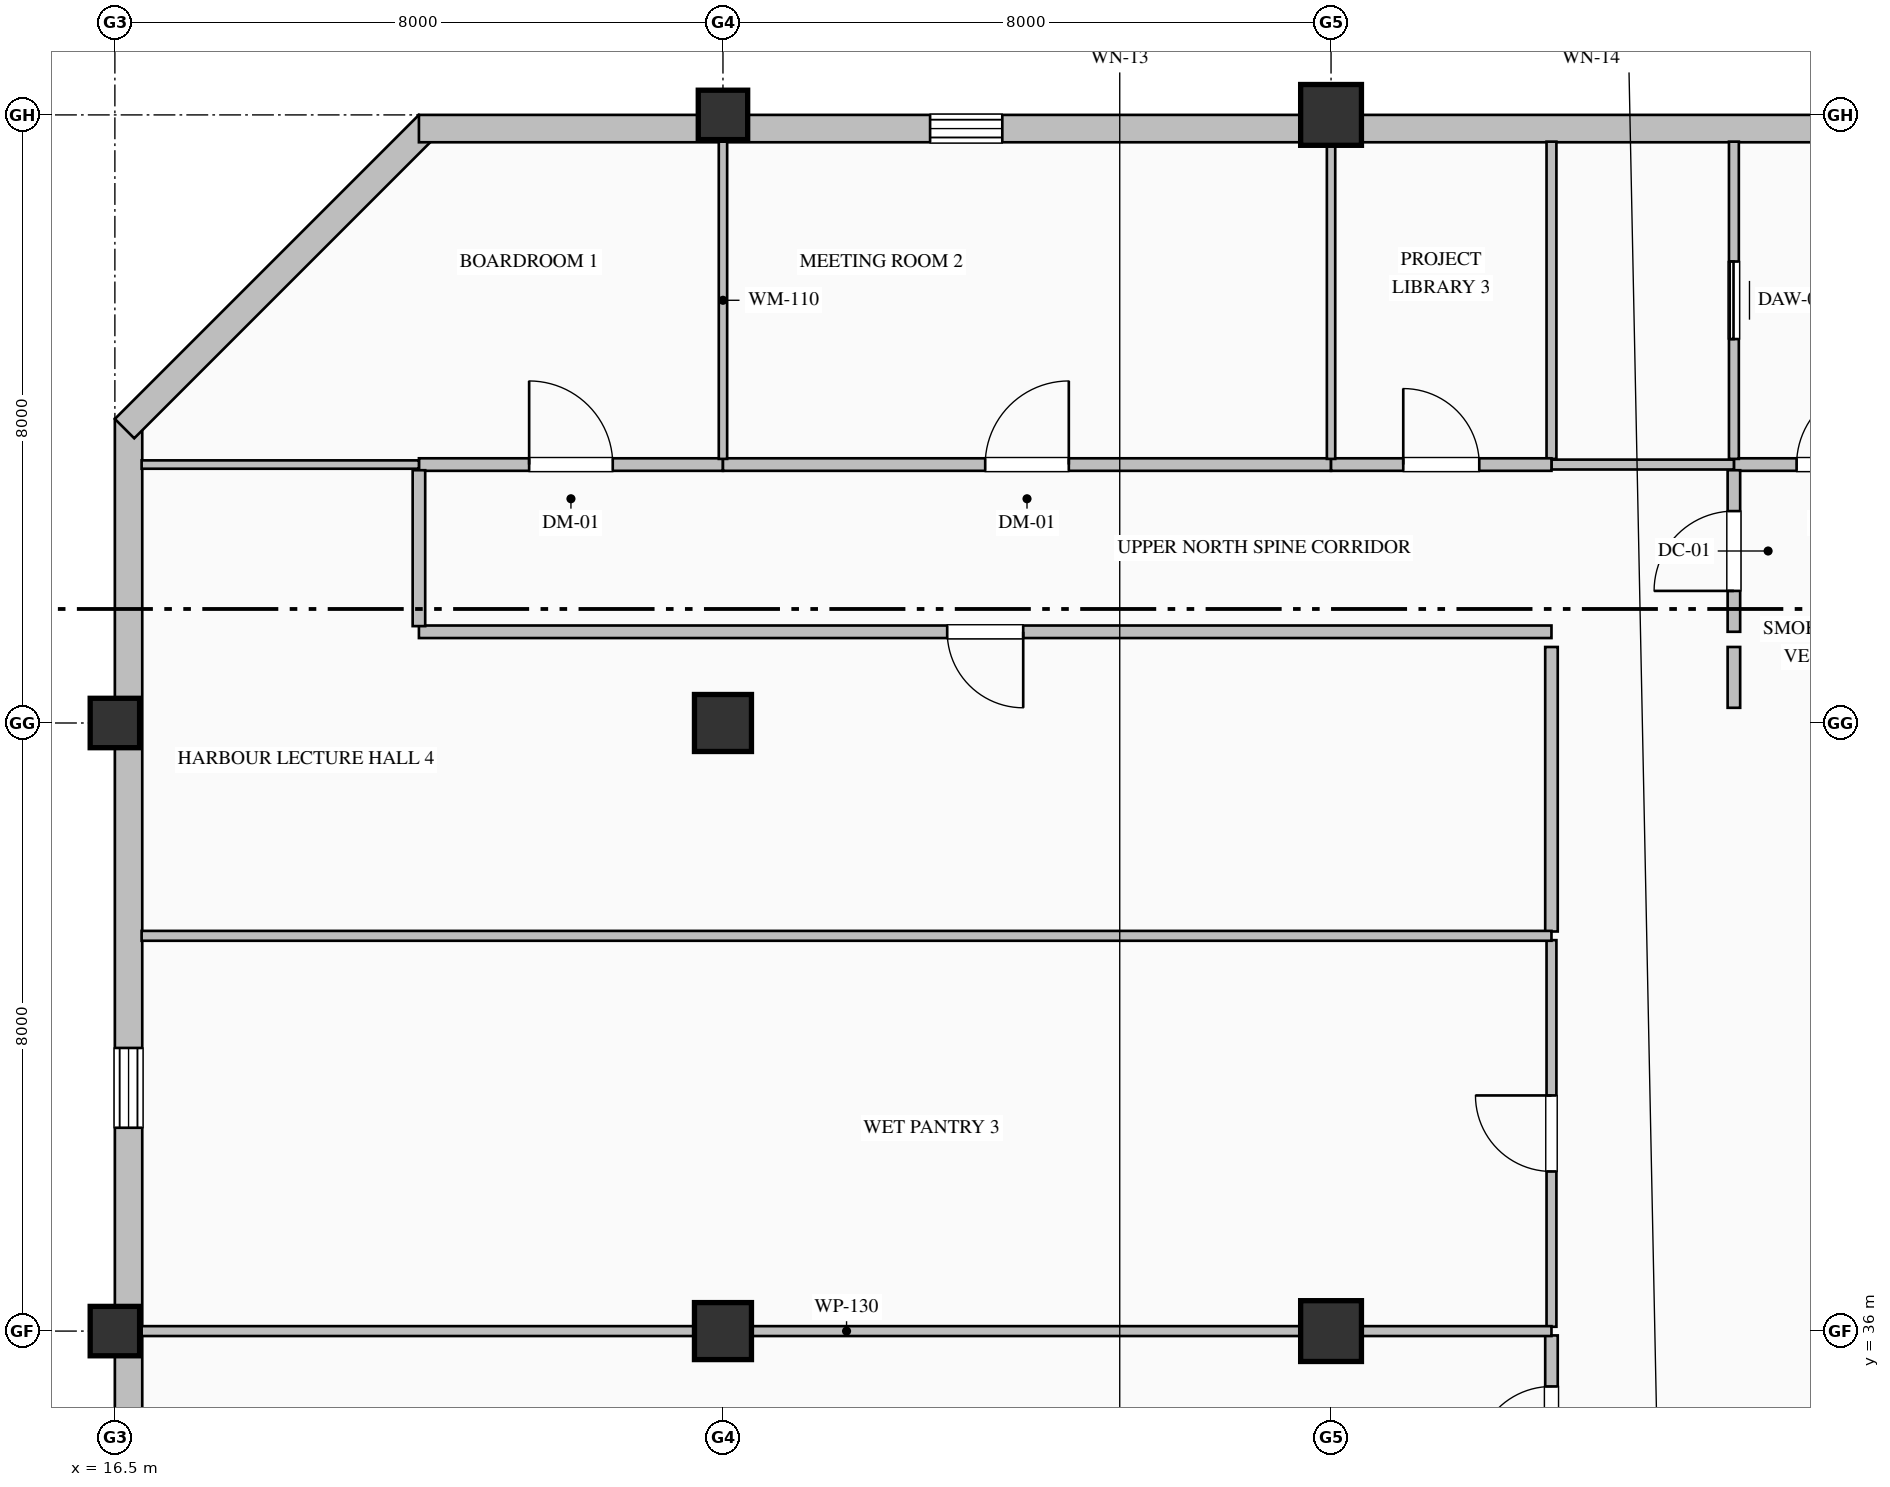
"""IFC4 building model, lengths in metres.
Left out: names, types, materials, properties, quantities, classifications, styles, units other than length and angle.
Written with IfcOpenShell. Run it as: python <this file> out.ifc"""

import sys

from ifc_helpers import new_model, si_unit, direction, frame, frame_2d, origin, origin_2d, place, context, subcontext, project, spatial, rectangle, hollow_rectangle, extrude, element, fill, save


model = new_model("IFC4")
c1 = context("Model", 3, precision=1e-05, world=origin(), true_north=direction((0.0, 1.0)))
c2 = subcontext(c1, "Body", "Model", "MODEL_VIEW")
j1 = project(units=[si_unit("LENGTHUNIT", "METRE"), si_unit("PLANEANGLEUNIT", "RADIAN")], contexts=[c1])
p1 = place(None, origin())
s1 = spatial("IfcSite", under=j1, at=p1, CompositionType="ELEMENT")
p2 = place(p1, origin())
s2 = spatial("IfcBuilding", under=s1, at=p2, CompositionType="ELEMENT")
p3 = place(p2, frame((0.0, 0.0, 311.2)))
s3 = spatial("IfcBuildingStorey", under=s2, at=p3, CompositionType="ELEMENT", Elevation=311.2)
for number, where, z_axis, x_axis in (
    (1, (16.5, 36.0, 0.0), (0.0, 0.0, 1.0), (1.0, 0.0, 0.0)),
    (2, (16.5, 44.0, 0.0), (0.0, 0.0, 1.0), (1.0, 0.0, 0.0)),
):
    element("IfcColumn", number, at=place(p3, frame(where, z_axis=z_axis, x_axis=x_axis)), inside=s3, PredefinedType="COLUMN", context=c2, shape_type="SweptSolid", body=[
        extrude(hollow_rectangle(XDim=0.65, YDim=0.65, WallThickness=0.028, at=origin_2d()), origin(), (0.0, 0.0, 1.0), 4.0),
    ])
for number, where, z_axis, x_axis in (
    (3, (24.5, 36.0, 0.0), (0.0, 0.0, 1.0), (1.0, 0.0, 0.0)),
    (4, (24.5, 44.0, 0.0), (0.0, 0.0, 1.0), (1.0, 0.0, 0.0)),
):
    element("IfcColumn", number, at=place(p3, frame(where, z_axis=z_axis, x_axis=x_axis)), inside=s3, PredefinedType="COLUMN", context=c2, shape_type="SweptSolid", body=[
        extrude(rectangle(XDim=0.75, YDim=0.75, at=origin_2d()), origin(), (0.0, 0.0, 1.0), 4.0),
    ])
p4 = place(p3, frame((24.5, 52.0, 0.0), z_axis=(0.0, 0.0, 1.0), x_axis=(1.0, 0.0, 0.0)))
e5 = element("IfcColumn", 5, at=p4, inside=s3, PredefinedType="COLUMN", context=c2, shape_type="SweptSolid", body=[
    extrude(hollow_rectangle(XDim=0.65, YDim=0.65, WallThickness=0.028, at=origin_2d()), origin(), (0.0, 0.0, 1.0), 4.0),
])
for number, where, z_axis, x_axis in (
    (6, (32.5, 36.0, 0.0), (0.0, 0.0, 1.0), (1.0, 0.0, 0.0)),
    (7, (32.5, 52.0, 0.0), (0.0, 0.0, 1.0), (1.0, 0.0, 0.0)),
):
    element("IfcColumn", number, at=place(p3, frame(where, z_axis=z_axis, x_axis=x_axis)), inside=s3, PredefinedType="COLUMN", context=c2, shape_type="SweptSolid", body=[
        extrude(hollow_rectangle(XDim=0.8, YDim=0.8, WallThickness=0.032, at=origin_2d()), origin(), (0.0, 0.0, 1.0), 4.0),
    ])
p5 = place(p3, frame((16.68, 32.0, 0.0), z_axis=(0.0, 0.0, 1.0), x_axis=(0.0, 1.0, 0.0)))
e8 = element("IfcWall", 8, at=p5, inside=s3, PredefinedType="SOLIDWALL", context=c2, shape_type="SweptSolid", body=[
    extrude(rectangle(XDim=16.0, YDim=0.36, at=frame_2d((8.0, 0.0))), origin(), (0.0, 0.0, 1.0), 3.335),
])
p6 = place(p5, frame((6.675, 0.0, 0.8)))
e9 = element("IfcOpeningElement", 9, at=p6, cuts=e8, PredefinedType="OPENING", context=c2, shape_type="SweptSolid", body=[
    extrude(rectangle(XDim=1.05, YDim=2.15, at=frame_2d((0.525, 1.075))), frame((0.0, 0.19, 0.0), z_axis=(0.0, -1.0, 0.0), x_axis=(1.0, 0.0, 0.0)), (0.0, 0.0, 1.0), 0.38),
])
p7 = place(p3, frame((16.627, 47.873, 0.0), z_axis=(0.0, 0.0, 1.0), x_axis=(0.707106781187, 0.707106781187, 0.0)))
e10 = element("IfcWall", 10, at=p7, inside=s3, PredefinedType="SOLIDWALL", context=c2, shape_type="SweptSolid", body=[
    extrude(rectangle(XDim=5.657, YDim=0.36, at=frame_2d((2.828, 0.0))), origin(), (0.0, 0.0, 1.0), 3.785),
])
p8 = place(p3, frame((20.5, 51.82, 0.0), z_axis=(0.0, 0.0, 1.0), x_axis=(1.0, 0.0, 0.0)))
e11 = element("IfcWall", 11, at=p8, inside=s3, PredefinedType="SOLIDWALL", context=c2, shape_type="SweptSolid", body=[
    extrude(rectangle(XDim=20.02, YDim=0.36, at=frame_2d((10.01, 0.0))), origin(), (0.0, 0.0, 1.0), 3.335),
])
p9 = place(p8, frame((6.725, 0.0, 0.9)))
e12 = element("IfcOpeningElement", 12, at=p9, cuts=e11, PredefinedType="OPENING", context=c2, shape_type="SweptSolid", body=[
    extrude(rectangle(XDim=0.95, YDim=1.85, at=frame_2d((0.475, 0.925))), frame((0.0, 0.19, 0.0), z_axis=(0.0, -1.0, 0.0), x_axis=(1.0, 0.0, 0.0)), (0.0, 0.0, 1.0), 0.38),
])
p10 = place(p3, frame((37.8, 47.4, 0.0), z_axis=(0.0, 0.0, 1.0), x_axis=(1.0, 0.0, 0.0)))
e13 = element("IfcWall", 13, at=p10, inside=s3, PredefinedType="PARTITIONING", context=c2, shape_type="SweptSolid", body=[
    extrude(rectangle(XDim=2.7, YDim=0.165, at=frame_2d((1.35, 0.0))), origin(), (0.0, 0.0, 1.0), 3.785),
])
p11 = place(p10, frame((0.825, 0.0, 0.0)))
e14 = element("IfcOpeningElement", 14, at=p11, cuts=e13, PredefinedType="OPENING", context=c2, shape_type="SweptSolid", body=[
    extrude(rectangle(XDim=1.05, YDim=2.15, at=frame_2d((0.525, 1.075))), frame((0.0, 0.093, 0.0), z_axis=(0.0, -1.0, 0.0), x_axis=(1.0, 0.0, 0.0)), (0.0, 0.0, 1.0), 0.185),
])
p12 = place(p3, frame((37.8, 45.2, 0.0), z_axis=(0.0, 0.0, 1.0), x_axis=(0.0, 1.0, 0.0)))
e15 = element("IfcWall", 15, at=p12, inside=s3, PredefinedType="PARTITIONING", context=c2, shape_type="SweptSolid", body=[
    extrude(rectangle(XDim=2.125, YDim=0.165, at=frame_2d((1.063, 0.0))), origin(), (0.0, 0.0, 1.0), 3.785),
])
p13 = place(p12, frame((0.538, 0.0, 0.0)))
e16 = element("IfcOpeningElement", 16, at=p13, cuts=e15, PredefinedType="OPENING", context=c2, shape_type="SweptSolid", body=[
    extrude(rectangle(XDim=1.05, YDim=2.15, at=frame_2d((0.525, 1.075))), frame((0.0, 0.093, 0.0), z_axis=(0.0, -1.0, 0.0), x_axis=(1.0, 0.0, 0.0)), (0.0, 0.0, 1.0), 0.185),
])
p14 = place(p3, frame((37.8, 44.2, 0.0), z_axis=(0.0, 0.0, 1.0), x_axis=(0.0, 1.0, 0.0)))
e17 = element("IfcWall", 17, at=p14, inside=s3, PredefinedType="PARTITIONING", context=c2, shape_type="SweptSolid", body=[
    extrude(rectangle(XDim=0.8, YDim=0.165, at=frame_2d((0.4, 0.0))), origin(), (0.0, 0.0, 1.0), 3.785),
])
p15 = place(p3, frame((37.8, 47.475, 0.0), z_axis=(0.0, 0.0, 1.0), x_axis=(0.0, 1.0, 0.0)))
e18 = element("IfcWall", 18, at=p15, inside=s3, PredefinedType="PARTITIONING", context=c2, shape_type="SweptSolid", body=[
    extrude(rectangle(XDim=4.173, YDim=0.13, at=frame_2d((2.087, 0.0))), origin(), (0.0, 0.0, 1.0), 3.785),
])
p16 = place(p15, frame((1.577, 0.0, 0.0)))
e19 = element("IfcOpeningElement", 19, at=p16, cuts=e18, PredefinedType="OPENING", context=c2, shape_type="SweptSolid", body=[
    extrude(rectangle(XDim=1.02, YDim=2.15, at=frame_2d((0.51, 1.075))), frame((0.0, 0.075, 0.0), z_axis=(0.0, -1.0, 0.0), x_axis=(1.0, 0.0, 0.0)), (0.0, 0.0, 1.0), 0.15),
])
p17 = place(p3, frame((37.8, 47.4, 0.0), z_axis=(0.0, 0.0, 1.0), x_axis=(-1.0, 0.0, 0.0)))
e20 = element("IfcWall", 20, at=p17, inside=s3, PredefinedType="PARTITIONING", context=c2, shape_type="SweptSolid", body=[
    extrude(rectangle(XDim=2.4, YDim=0.13, at=frame_2d((1.2, 0.0))), origin(), (0.0, 0.0, 1.0), 3.785),
])
p18 = place(p3, frame((35.4, 47.475, 0.0), z_axis=(0.0, 0.0, 1.0), x_axis=(0.0, 1.0, 0.0)))
e21 = element("IfcWall", 21, at=p18, inside=s3, PredefinedType="PARTITIONING", context=c2, shape_type="SweptSolid", body=[
    extrude(rectangle(XDim=4.173, YDim=0.13, at=frame_2d((2.087, 0.0))), origin(), (0.0, 0.0, 1.0), 3.785),
])
p19 = place(p3, frame((20.5, 47.4, 0.0), z_axis=(0.0, 0.0, 1.0), x_axis=(1.0, 0.0, 0.0)))
e22 = element("IfcWall", 22, at=p19, inside=s3, PredefinedType="PARTITIONING", context=c2, shape_type="SweptSolid", body=[
    extrude(rectangle(XDim=4.0, YDim=0.165, at=frame_2d((2.0, 0.0))), origin(), (0.0, 0.0, 1.0), 3.785),
])
p20 = place(p19, frame((1.45, 0.0, 0.0)))
e23 = element("IfcOpeningElement", 23, at=p20, cuts=e22, PredefinedType="OPENING", context=c2, shape_type="SweptSolid", body=[
    extrude(rectangle(XDim=1.1, YDim=2.2, at=frame_2d((0.55, 1.1))), frame((0.0, 0.093, 0.0), z_axis=(0.0, -1.0, 0.0), x_axis=(1.0, 0.0, 0.0)), (0.0, 0.0, 1.0), 0.185),
])
p21 = place(p3, frame((24.5, 47.4, 0.0), z_axis=(0.0, 0.0, 1.0), x_axis=(1.0, 0.0, 0.0)))
e24 = element("IfcWall", 24, at=p21, inside=s3, PredefinedType="PARTITIONING", context=c2, shape_type="SweptSolid", body=[
    extrude(rectangle(XDim=8.0, YDim=0.165, at=frame_2d((4.0, 0.0))), origin(), (0.0, 0.0, 1.0), 3.785),
])
p22 = place(p21, frame((3.45, 0.0, 0.0)))
e25 = element("IfcOpeningElement", 25, at=p22, cuts=e24, PredefinedType="OPENING", context=c2, shape_type="SweptSolid", body=[
    extrude(rectangle(XDim=1.1, YDim=2.2, at=frame_2d((0.55, 1.1))), frame((0.0, 0.093, 0.0), z_axis=(0.0, -1.0, 0.0), x_axis=(1.0, 0.0, 0.0)), (0.0, 0.0, 1.0), 0.185),
])
p23 = place(p3, frame((32.5, 47.4, 0.0), z_axis=(0.0, 0.0, 1.0), x_axis=(1.0, 0.0, 0.0)))
e26 = element("IfcWall", 26, at=p23, inside=s3, PredefinedType="PARTITIONING", context=c2, shape_type="SweptSolid", body=[
    extrude(rectangle(XDim=2.9, YDim=0.165, at=frame_2d((1.45, 0.0))), origin(), (0.0, 0.0, 1.0), 3.785),
])
p24 = place(p23, frame((0.95, 0.0, 0.0)))
e27 = element("IfcOpeningElement", 27, at=p24, cuts=e26, PredefinedType="OPENING", context=c2, shape_type="SweptSolid", body=[
    extrude(rectangle(XDim=1.0, YDim=2.15, at=frame_2d((0.5, 1.075))), frame((0.0, 0.093, 0.0), z_axis=(0.0, -1.0, 0.0), x_axis=(1.0, 0.0, 0.0)), (0.0, 0.0, 1.0), 0.185),
])
p25 = place(p3, frame((35.4, 45.2, 0.0), z_axis=(0.0, 0.0, 1.0), x_axis=(-1.0, 0.0, 0.0)))
e28 = element("IfcWall", 28, at=p25, inside=s3, PredefinedType="PARTITIONING", context=c2, shape_type="SweptSolid", body=[
    extrude(rectangle(XDim=14.9, YDim=0.165, at=frame_2d((7.45, 0.0))), origin(), (0.0, 0.0, 1.0), 3.785),
])
p26 = place(p25, frame((6.95, 0.0, 0.0)))
e29 = element("IfcOpeningElement", 29, at=p26, cuts=e28, PredefinedType="OPENING", context=c2, shape_type="SweptSolid", body=[
    extrude(rectangle(XDim=1.0, YDim=2.15, at=frame_2d((0.5, 1.075))), frame((0.0, 0.093, 0.0), z_axis=(0.0, -1.0, 0.0), x_axis=(1.0, 0.0, 0.0)), (0.0, 0.0, 1.0), 0.185),
])
p27 = place(p3, frame((20.5, 45.274, 0.0), z_axis=(0.0, 0.0, 1.0), x_axis=(0.0, 1.0, 0.0)))
e30 = element("IfcWall", 30, at=p27, inside=s3, PredefinedType="PARTITIONING", context=c2, shape_type="SweptSolid", body=[
    extrude(rectangle(XDim=2.051, YDim=0.165, at=frame_2d((1.025, 0.0))), origin(), (0.0, 0.0, 1.0), 3.785),
])
p28 = place(p3, frame((35.4, 33.6, 0.0), z_axis=(0.0, 0.0, 1.0), x_axis=(0.0, 1.0, 0.0)))
e31 = element("IfcWall", 31, at=p28, inside=s3, PredefinedType="PARTITIONING", context=c2, shape_type="SweptSolid", body=[
    extrude(rectangle(XDim=2.343, YDim=0.165, at=frame_2d((1.171, 0.0))), origin(), (0.0, 0.0, 1.0), 3.785),
])
p29 = place(p28, frame((0.671, 0.0, 0.0)))
e32 = element("IfcOpeningElement", 32, at=p29, cuts=e31, PredefinedType="OPENING", context=c2, shape_type="SweptSolid", body=[
    extrude(rectangle(XDim=1.0, YDim=2.15, at=frame_2d((0.5, 1.075))), frame((0.0, 0.093, 0.0), z_axis=(0.0, -1.0, 0.0), x_axis=(1.0, 0.0, 0.0)), (0.0, 0.0, 1.0), 0.185),
])
p30 = place(p3, frame((35.4, 36.057, 0.0), z_axis=(0.0, 0.0, 1.0), x_axis=(0.0, 1.0, 0.0)))
e33 = element("IfcWall", 33, at=p30, inside=s3, PredefinedType="PARTITIONING", context=c2, shape_type="SweptSolid", body=[
    extrude(rectangle(XDim=5.086, YDim=0.13, at=frame_2d((2.543, 0.0))), origin(), (0.0, 0.0, 1.0), 3.785),
])
p31 = place(p30, frame((2.043, 0.0, 0.0)))
e34 = element("IfcOpeningElement", 34, at=p31, cuts=e33, PredefinedType="OPENING", context=c2, shape_type="SweptSolid", body=[
    extrude(rectangle(XDim=1.0, YDim=2.15, at=frame_2d((0.5, 1.075))), frame((0.0, 0.075, 0.0), z_axis=(0.0, -1.0, 0.0), x_axis=(1.0, 0.0, 0.0)), (0.0, 0.0, 1.0), 0.15),
])
p32 = place(p3, frame((35.4, 41.257, 0.0), z_axis=(0.0, 0.0, 1.0), x_axis=(0.0, 1.0, 0.0)))
e35 = element("IfcWall", 35, at=p32, inside=s3, PredefinedType="PARTITIONING", context=c2, shape_type="SweptSolid", body=[
    extrude(rectangle(XDim=3.743, YDim=0.165, at=frame_2d((1.872, 0.0))), origin(), (0.0, 0.0, 1.0), 3.785),
])
p33 = place(p3, frame((24.5, 51.648, 0.0), z_axis=(0.0, 0.0, 1.0), x_axis=(0.0, -1.0, 0.0)))
e36 = element("IfcWall", 36, at=p33, inside=s3, PredefinedType="MOVABLE", context=c2, shape_type="SweptSolid", body=[
    extrude(rectangle(XDim=4.173, YDim=0.11, at=frame_2d((2.087, 0.0))), origin(), (0.0, 0.0, 1.0), 3.177),
])
p34 = place(p3, frame((20.5, 47.4, 0.0), z_axis=(0.0, 0.0, 1.0), x_axis=(-1.0, 0.0, 0.0)))
e37 = element("IfcWall", 37, at=p34, inside=s3, PredefinedType="MOVABLE", context=c2, shape_type="SweptSolid", body=[
    extrude(rectangle(XDim=3.648, YDim=0.11, at=frame_2d((1.824, 0.0))), origin(), (0.0, 0.0, 1.0), 3.785),
])
p35 = place(p3, frame((32.5, 51.648, 0.0), z_axis=(0.0, 0.0, 1.0), x_axis=(0.0, -1.0, 0.0)))
e38 = element("IfcWall", 38, at=p35, inside=s3, PredefinedType="MOVABLE", context=c2, shape_type="SweptSolid", body=[
    extrude(rectangle(XDim=4.173, YDim=0.11, at=frame_2d((2.087, 0.0))), origin(), (0.0, 0.0, 1.0), 3.785),
])
p36 = place(p3, frame((16.852, 36.0, 0.0), z_axis=(0.0, 0.0, 1.0), x_axis=(1.0, 0.0, 0.0)))
e39 = element("IfcWall", 39, at=p36, inside=s3, PredefinedType="PARTITIONING", context=c2, shape_type="SweptSolid", body=[
    extrude(rectangle(XDim=18.548, YDim=0.13, at=frame_2d((9.274, 0.0))), origin(), (0.0, 0.0, 1.0), 3.177),
])
p37 = place(p3, frame((16.852, 41.2, 0.0), z_axis=(0.0, 0.0, 1.0), x_axis=(1.0, 0.0, 0.0)))
e40 = element("IfcWall", 40, at=p37, inside=s3, PredefinedType="PARTITIONING", context=c2, shape_type="SweptSolid", body=[
    extrude(rectangle(XDim=18.548, YDim=0.13, at=frame_2d((9.274, 0.0))), origin(), (0.0, 0.0, 1.0), 3.785),
])
p38 = place(p6, origin())
e41 = element("IfcWindow", 41, at=p38, inside=s3, PartitioningType="SINGLE_PANEL", PredefinedType="WINDOW", context=c2, shape_type="SweptSolid", body=[
    extrude(rectangle(XDim=1.05, YDim=2.15, at=frame_2d((0.525, 1.075))), frame((0.0, 0.15, 0.0), z_axis=(0.0, -1.0, 0.0), x_axis=(1.0, 0.0, 0.0)), (0.0, 0.0, 1.0), 0.06),
])
fill(e9, e41)
p39 = place(p9, origin())
e42 = element("IfcWindow", 42, at=p39, inside=s3, PartitioningType="SINGLE_PANEL", PredefinedType="WINDOW", context=c2, shape_type="SweptSolid", body=[
    extrude(rectangle(XDim=0.95, YDim=1.85, at=frame_2d((0.475, 0.925))), frame((0.0, 0.15, 0.0), z_axis=(0.0, -1.0, 0.0), x_axis=(1.0, 0.0, 0.0)), (0.0, 0.0, 1.0), 0.06),
])
fill(e12, e42)
p40 = place(p11, origin())
e43 = element("IfcDoor", 43, at=p40, inside=s3, OperationType="SINGLE_SWING_RIGHT", PredefinedType="DOOR", context=c2, shape_type="SweptSolid", body=[
    extrude(rectangle(XDim=1.05, YDim=2.15, at=frame_2d((0.525, 1.075))), frame((0.0, 0.025, 0.0), z_axis=(0.0, -1.0, 0.0), x_axis=(1.0, 0.0, 0.0)), (0.0, 0.0, 1.0), 0.05),
])
fill(e14, e43)
p41 = place(p13, origin())
e44 = element("IfcDoor", 44, at=p41, inside=s3, OperationType="SINGLE_SWING_LEFT", PredefinedType="DOOR", context=c2, shape_type="SweptSolid", body=[
    extrude(rectangle(XDim=1.05, YDim=2.15, at=frame_2d((0.525, 1.075))), frame((0.0, 0.025, 0.0), z_axis=(0.0, -1.0, 0.0), x_axis=(1.0, 0.0, 0.0)), (0.0, 0.0, 1.0), 0.05),
])
fill(e16, e44)
p42 = place(p16, origin())
e45 = element("IfcDoor", 45, at=p42, inside=s3, OperationType="SLIDING_TO_LEFT", PredefinedType="DOOR", context=c2, shape_type="SweptSolid", body=[
    extrude(rectangle(XDim=1.02, YDim=2.15, at=frame_2d((0.51, 1.075))), frame((0.0, 0.025, 0.0), z_axis=(0.0, -1.0, 0.0), x_axis=(1.0, 0.0, 0.0)), (0.0, 0.0, 1.0), 0.05),
])
fill(e19, e45)
p43 = place(p20, origin())
e46 = element("IfcDoor", 46, at=p43, inside=s3, OperationType="SINGLE_SWING_LEFT", PredefinedType="DOOR", context=c2, shape_type="SweptSolid", body=[
    extrude(rectangle(XDim=1.1, YDim=2.2, at=frame_2d((0.55, 1.1))), frame((0.0, 0.025, 0.0), z_axis=(0.0, -1.0, 0.0), x_axis=(1.0, 0.0, 0.0)), (0.0, 0.0, 1.0), 0.05),
])
fill(e23, e46)
p44 = place(p22, origin())
e47 = element("IfcDoor", 47, at=p44, inside=s3, OperationType="SINGLE_SWING_RIGHT", PredefinedType="DOOR", context=c2, shape_type="SweptSolid", body=[
    extrude(rectangle(XDim=1.1, YDim=2.2, at=frame_2d((0.55, 1.1))), frame((0.0, 0.025, 0.0), z_axis=(0.0, -1.0, 0.0), x_axis=(1.0, 0.0, 0.0)), (0.0, 0.0, 1.0), 0.05),
])
fill(e25, e47)
p45 = place(p24, origin())
e48 = element("IfcDoor", 48, at=p45, inside=s3, OperationType="SINGLE_SWING_LEFT", PredefinedType="DOOR", context=c2, shape_type="SweptSolid", body=[
    extrude(rectangle(XDim=1.0, YDim=2.15, at=frame_2d((0.5, 1.075))), frame((0.0, 0.025, 0.0), z_axis=(0.0, -1.0, 0.0), x_axis=(1.0, 0.0, 0.0)), (0.0, 0.0, 1.0), 0.05),
])
fill(e27, e48)
p46 = place(p29, origin())
e49 = element("IfcDoor", 49, at=p46, inside=s3, OperationType="SINGLE_SWING_LEFT", PredefinedType="DOOR", context=c2, shape_type="SweptSolid", body=[
    extrude(rectangle(XDim=1.0, YDim=2.15, at=frame_2d((0.5, 1.075))), frame((0.0, 0.025, 0.0), z_axis=(0.0, -1.0, 0.0), x_axis=(1.0, 0.0, 0.0)), (0.0, 0.0, 1.0), 0.05),
])
fill(e32, e49)
p47 = place(p31, origin())
e50 = element("IfcDoor", 50, at=p47, inside=s3, OperationType="SINGLE_SWING_RIGHT", PredefinedType="DOOR", context=c2, shape_type="SweptSolid", body=[
    extrude(rectangle(XDim=1.0, YDim=2.15, at=frame_2d((0.5, 1.075))), frame((0.0, 0.025, 0.0), z_axis=(0.0, -1.0, 0.0), x_axis=(1.0, 0.0, 0.0)), (0.0, 0.0, 1.0), 0.05),
])
fill(e34, e50)
p48 = place(p26, origin())
e51 = element("IfcDoor", 51, at=p48, inside=s3, OperationType="SINGLE_SWING_LEFT", PredefinedType="DOOR", context=c2, shape_type="SweptSolid", body=[
    extrude(rectangle(XDim=1.0, YDim=2.15, at=frame_2d((0.5, 1.075))), frame((0.0, 0.025, 0.0), z_axis=(0.0, -1.0, 0.0), x_axis=(1.0, 0.0, 0.0)), (0.0, 0.0, 1.0), 0.05),
])
fill(e29, e51)
save(model, sys.argv[1])
